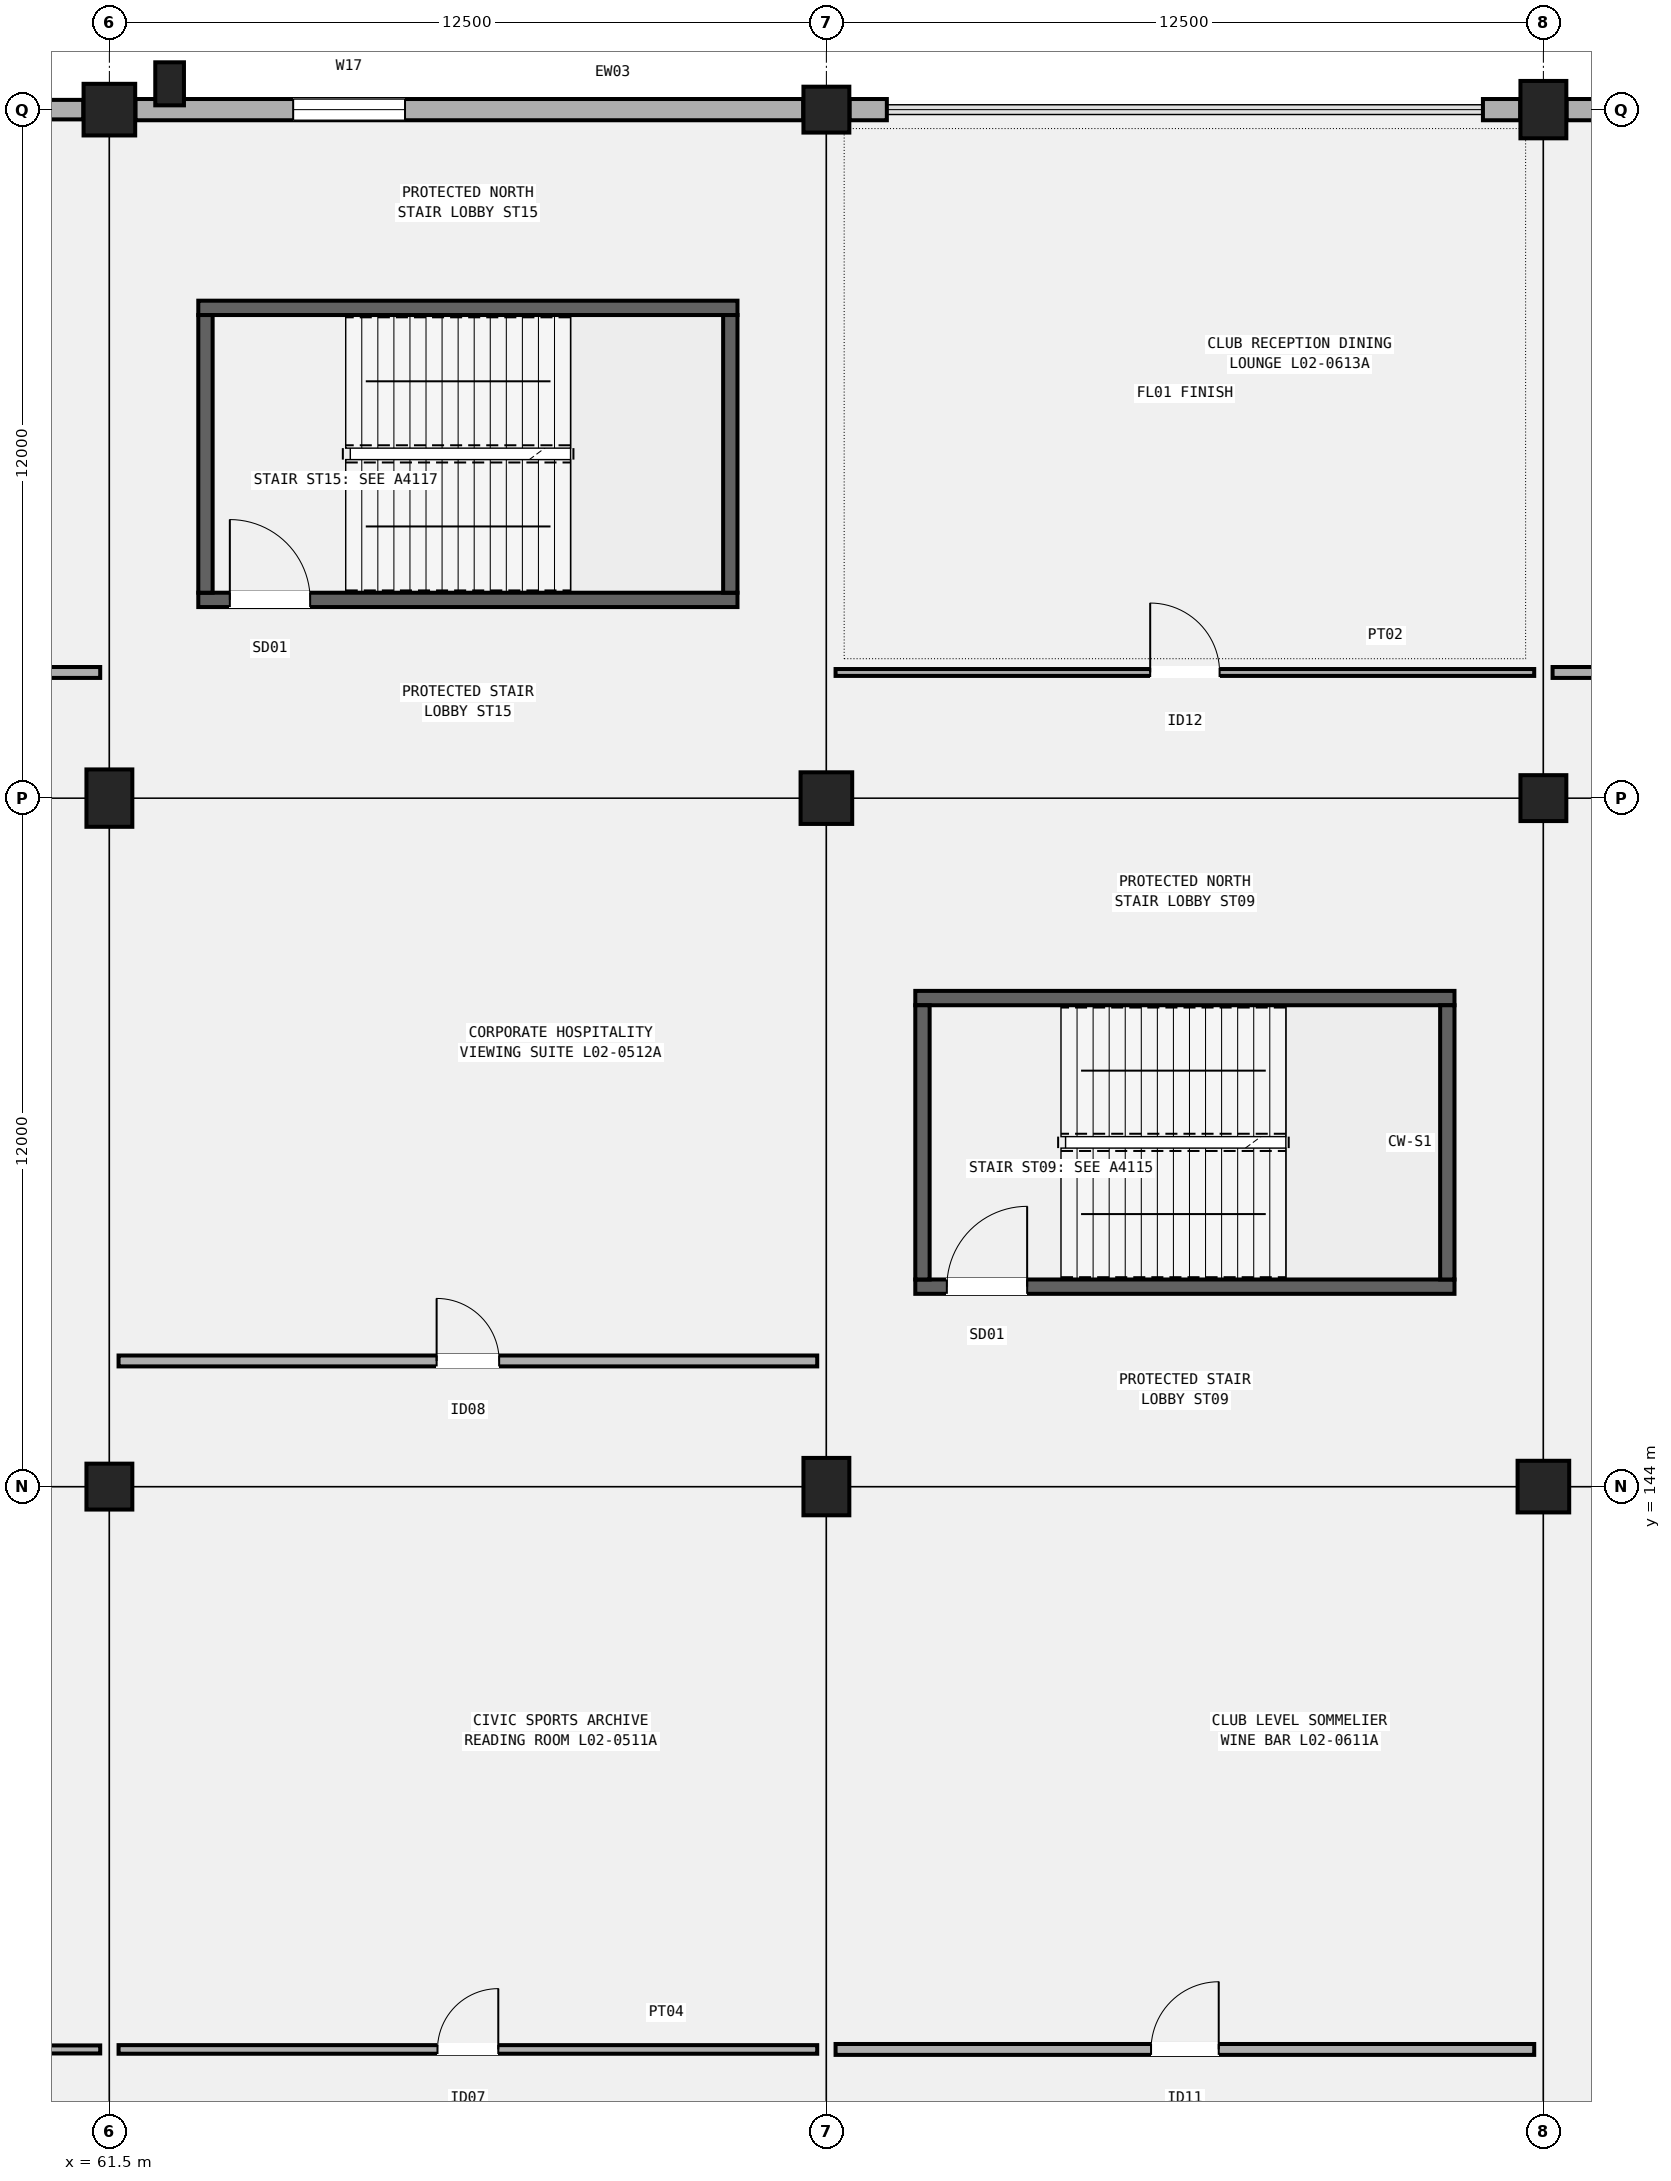
"""IFC4 building model, lengths in metres.
Left out: names, types, materials, properties, quantities, classifications, styles, units other than length and angle.
Written with IfcOpenShell. Run it as: python <this file> out.ifc"""

import sys

from ifc_helpers import new_model, si_unit, direction, frame, frame_2d, origin, origin_2d, place, context, subcontext, project, spatial, rectangle, extrude, element, fill, save


model = new_model("IFC4")
c1 = context("Model", 3, precision=1e-05, world=origin(), true_north=direction((0.0, 1.0)))
c2 = subcontext(c1, "Body", "Model", "MODEL_VIEW")
j1 = project(units=[si_unit("LENGTHUNIT", "METRE"), si_unit("PLANEANGLEUNIT", "RADIAN")], contexts=[c1])
p1 = place(None, origin())
s1 = spatial("IfcSite", under=j1, at=p1, CompositionType="ELEMENT")
p2 = place(p1, origin())
s2 = spatial("IfcBuilding", under=s1, at=p2, CompositionType="ELEMENT")
p3 = place(p2, frame((0.0, 0.0, 10.2)))
s3 = spatial("IfcBuildingStorey", under=s2, at=p3, CompositionType="ELEMENT", Elevation=10.2)
p4 = place(p3, frame((61.5, 144.0, 0.0), z_axis=(0.0, 0.0, 1.0), x_axis=(1.0, 0.0, 0.0)))
e1 = element("IfcColumn", 1, at=p4, inside=s3, PredefinedType="COLUMN", context=c2, shape_type="SweptSolid", body=[
    extrude(rectangle(XDim=0.8, YDim=0.8, at=origin_2d()), origin(), (0.0, 0.0, 1.0), 5.1),
])
p5 = place(p3, frame((61.5, 156.0, 0.0), z_axis=(0.0, 0.0, 1.0), x_axis=(1.0, 0.0, 0.0)))
e2 = element("IfcColumn", 2, at=p5, inside=s3, PredefinedType="COLUMN", context=c2, shape_type="SweptSolid", body=[
    extrude(rectangle(XDim=0.8, YDim=1.0, at=origin_2d()), origin(), (0.0, 0.0, 1.0), 5.1),
])
p6 = place(p3, frame((61.5, 168.0, 0.0), z_axis=(0.0, 0.0, 1.0), x_axis=(1.0, 0.0, 0.0)))
e3 = element("IfcColumn", 3, at=p6, inside=s3, PredefinedType="COLUMN", context=c2, shape_type="SweptSolid", body=[
    extrude(rectangle(XDim=0.9, YDim=0.9, at=origin_2d()), origin(), (0.0, 0.0, 1.0), 5.1),
])
p7 = place(p3, frame((74.0, 144.0, 0.0), z_axis=(0.0, 0.0, 1.0), x_axis=(1.0, 0.0, 0.0)))
e4 = element("IfcColumn", 4, at=p7, inside=s3, PredefinedType="COLUMN", context=c2, shape_type="SweptSolid", body=[
    extrude(rectangle(XDim=0.8, YDim=1.0, at=origin_2d()), origin(), (0.0, 0.0, 1.0), 5.1),
])
p8 = place(p3, frame((74.0, 156.0, 0.0), z_axis=(0.0, 0.0, 1.0), x_axis=(1.0, 0.0, 0.0)))
e5 = element("IfcColumn", 5, at=p8, inside=s3, PredefinedType="COLUMN", context=c2, shape_type="SweptSolid", body=[
    extrude(rectangle(XDim=0.9, YDim=0.9, at=origin_2d()), origin(), (0.0, 0.0, 1.0), 5.1),
])
p9 = place(p3, frame((74.0, 168.0, 0.0), z_axis=(0.0, 0.0, 1.0), x_axis=(1.0, 0.0, 0.0)))
e6 = element("IfcColumn", 6, at=p9, inside=s3, PredefinedType="COLUMN", context=c2, shape_type="SweptSolid", body=[
    extrude(rectangle(XDim=0.8, YDim=0.8, at=origin_2d()), origin(), (0.0, 0.0, 1.0), 5.1),
])
p10 = place(p3, frame((86.5, 144.0, 0.0), z_axis=(0.0, 0.0, 1.0), x_axis=(1.0, 0.0, 0.0)))
e7 = element("IfcColumn", 7, at=p10, inside=s3, PredefinedType="COLUMN", context=c2, shape_type="SweptSolid", body=[
    extrude(rectangle(XDim=0.9, YDim=0.9, at=origin_2d()), origin(), (0.0, 0.0, 1.0), 5.1),
])
p11 = place(p3, frame((86.5, 156.0, 0.0), z_axis=(0.0, 0.0, 1.0), x_axis=(1.0, 0.0, 0.0)))
e8 = element("IfcColumn", 8, at=p11, inside=s3, PredefinedType="COLUMN", context=c2, shape_type="SweptSolid", body=[
    extrude(rectangle(XDim=0.8, YDim=0.8, at=origin_2d()), origin(), (0.0, 0.0, 1.0), 5.1),
])
p12 = place(p3, frame((86.5, 168.0, 0.0), z_axis=(0.0, 0.0, 1.0), x_axis=(1.0, 0.0, 0.0)))
e9 = element("IfcColumn", 9, at=p12, inside=s3, PredefinedType="COLUMN", context=c2, shape_type="SweptSolid", body=[
    extrude(rectangle(XDim=0.8, YDim=1.0, at=origin_2d()), origin(), (0.0, 0.0, 1.0), 5.1),
])
p13 = place(p3, frame((62.55, 168.45, 0.0), z_axis=(0.0, 0.0, 1.0), x_axis=(1.0, 0.0, 0.0)))
e10 = element("IfcColumn", 10, at=p13, inside=s3, PredefinedType="PILASTER", context=c2, shape_type="SweptSolid", body=[
    extrude(rectangle(XDim=0.5, YDim=0.75, at=origin_2d()), origin(), (0.0, 0.0, 1.0), 5.1),
])
p14 = place(p3, frame((49.404, 168.0, 0.0), z_axis=(0.0, 0.0, 1.0), x_axis=(1.0, 0.0, 0.0)))
e11 = element("IfcWall", 11, at=p14, inside=s3, PredefinedType="SOLIDWALL", context=c2, shape_type="SweptSolid", body=[
    extrude(rectangle(XDim=11.642, YDim=0.34, at=frame_2d((5.821, 0.0))), origin(), (0.0, 0.0, 1.0), 4.02),
])
p15 = place(p14, frame((1.5, 0.0, 0.95)))
e12 = element("IfcOpeningElement", 12, at=p15, cuts=e11, PredefinedType="OPENING", context=c2, shape_type="SweptSolid", body=[
    extrude(rectangle(XDim=1.8, YDim=2.15, at=frame_2d((0.9, 1.075))), frame((0.0, 0.18, 0.0), z_axis=(0.0, -1.0, 0.0), x_axis=(1.0, 0.0, 0.0)), (0.0, 0.0, 1.0), 0.36),
])
p16 = place(p3, frame((61.954, 168.0, 0.0), z_axis=(0.0, 0.0, 1.0), x_axis=(1.0, 0.0, 0.0)))
e13 = element("IfcWall", 13, at=p16, inside=s3, PredefinedType="SOLIDWALL", context=c2, shape_type="SweptSolid", body=[
    extrude(rectangle(XDim=11.642, YDim=0.37, at=frame_2d((5.821, 0.0))), origin(), (0.0, 0.0, 1.0), 4.12),
])
p17 = place(p16, frame((2.75, 0.0, 0.95)))
e14 = element("IfcOpeningElement", 14, at=p17, cuts=e13, PredefinedType="OPENING", context=c2, shape_type="SweptSolid", body=[
    extrude(rectangle(XDim=1.95, YDim=2.35, at=frame_2d((0.975, 1.175))), frame((0.0, 0.195, 0.0), z_axis=(0.0, -1.0, 0.0), x_axis=(1.0, 0.0, 0.0)), (0.0, 0.0, 1.0), 0.39),
])
for number, where, z_axis, x_axis in (
    (15, (74.404, 168.0, 0.0), (0.0, 0.0, 1.0), (1.0, 0.0, 0.0)),
    (16, (85.446, 168.0, 0.0), (0.0, 0.0, 1.0), (1.0, 0.0, 0.0)),
):
    element("IfcWall", number, at=place(p3, frame(where, z_axis=z_axis, x_axis=x_axis)), inside=s3, PredefinedType="SOLIDWALL", context=c2, shape_type="SweptSolid", body=[
        extrude(rectangle(XDim=0.65, YDim=0.37, at=frame_2d((0.325, 0.0))), origin(), (0.0, 0.0, 1.0), 4.22),
    ])
p18 = place(p3, frame((86.904, 168.0, 0.0), z_axis=(0.0, 0.0, 1.0), x_axis=(1.0, 0.0, 0.0)))
e17 = element("IfcWall", 17, at=p18, inside=s3, PredefinedType="SOLIDWALL", context=c2, shape_type="SweptSolid", body=[
    extrude(rectangle(XDim=0.65, YDim=0.37, at=frame_2d((0.325, 0.0))), origin(), (0.0, 0.0, 1.0), 4.02),
])
p19 = place(p3, frame((75.55, 147.485, 0.0), z_axis=(0.0, 0.0, 1.0), x_axis=(1.0, 0.0, 0.0)))
e18 = element("IfcWall", 18, at=p19, inside=s3, PredefinedType="SHEAR", context=c2, shape_type="SweptSolid", body=[
    extrude(rectangle(XDim=9.4, YDim=0.25, at=frame_2d((4.7, 0.0))), origin(), (0.0, 0.0, 1.0), 4.82),
])
p20 = place(p19, frame((0.55, 0.0, 0.0)))
e19 = element("IfcOpeningElement", 19, at=p20, cuts=e18, PredefinedType="OPENING", context=c2, shape_type="SweptSolid", body=[
    extrude(rectangle(XDim=1.4, YDim=2.15, at=frame_2d((0.7, 1.075))), frame((0.0, 0.135, 0.0), z_axis=(0.0, -1.0, 0.0), x_axis=(1.0, 0.0, 0.0)), (0.0, 0.0, 1.0), 0.27),
])
p21 = place(p3, frame((75.55, 152.515, 0.0), z_axis=(0.0, 0.0, 1.0), x_axis=(1.0, 0.0, 0.0)))
e20 = element("IfcWall", 20, at=p21, inside=s3, PredefinedType="SHEAR", context=c2, shape_type="SweptSolid", body=[
    extrude(rectangle(XDim=9.4, YDim=0.25, at=frame_2d((4.7, 0.0))), origin(), (0.0, 0.0, 1.0), 4.82),
])
for number, where, z_axis, x_axis in (
    (21, (75.675, 147.61, 0.0), (0.0, 0.0, 1.0), (0.0, 1.0, 0.0)),
    (22, (84.825, 147.61, 0.0), (0.0, 0.0, 1.0), (0.0, 1.0, 0.0)),
):
    element("IfcWall", number, at=place(p3, frame(where, z_axis=z_axis, x_axis=x_axis)), inside=s3, PredefinedType="SHEAR", context=c2, shape_type="SweptSolid", body=[
        extrude(rectangle(XDim=4.78, YDim=0.25, at=frame_2d((2.39, 0.0))), origin(), (0.0, 0.0, 1.0), 4.82),
    ])
p22 = place(p3, frame((63.05, 159.455, 0.0), z_axis=(0.0, 0.0, 1.0), x_axis=(1.0, 0.0, 0.0)))
e23 = element("IfcWall", 23, at=p22, inside=s3, PredefinedType="SHEAR", context=c2, shape_type="SweptSolid", body=[
    extrude(rectangle(XDim=9.4, YDim=0.25, at=frame_2d((4.7, 0.0))), origin(), (0.0, 0.0, 1.0), 4.82),
])
p23 = place(p22, frame((0.55, 0.0, 0.0)))
e24 = element("IfcOpeningElement", 24, at=p23, cuts=e23, PredefinedType="OPENING", context=c2, shape_type="SweptSolid", body=[
    extrude(rectangle(XDim=1.4, YDim=2.15, at=frame_2d((0.7, 1.075))), frame((0.0, 0.135, 0.0), z_axis=(0.0, -1.0, 0.0), x_axis=(1.0, 0.0, 0.0)), (0.0, 0.0, 1.0), 0.27),
])
p24 = place(p3, frame((63.05, 164.545, 0.0), z_axis=(0.0, 0.0, 1.0), x_axis=(1.0, 0.0, 0.0)))
e25 = element("IfcWall", 25, at=p24, inside=s3, PredefinedType="SHEAR", context=c2, shape_type="SweptSolid", body=[
    extrude(rectangle(XDim=9.4, YDim=0.25, at=frame_2d((4.7, 0.0))), origin(), (0.0, 0.0, 1.0), 4.82),
])
for number, where, z_axis, x_axis in (
    (26, (63.175, 159.58, 0.0), (0.0, 0.0, 1.0), (0.0, 1.0, 0.0)),
    (27, (72.325, 159.58, 0.0), (0.0, 0.0, 1.0), (0.0, 1.0, 0.0)),
):
    element("IfcWall", number, at=place(p3, frame(where, z_axis=z_axis, x_axis=x_axis)), inside=s3, PredefinedType="SHEAR", context=c2, shape_type="SweptSolid", body=[
        extrude(rectangle(XDim=4.84, YDim=0.25, at=frame_2d((2.42, 0.0))), origin(), (0.0, 0.0, 1.0), 4.82),
    ])
p25 = place(p3, frame((51.12, 134.19, 0.0), z_axis=(0.0, 0.0, 1.0), x_axis=(1.0, 0.0, 0.0)))
e28 = element("IfcWall", 28, at=p25, inside=s3, PredefinedType="PARTITIONING", context=c2, shape_type="SweptSolid", body=[
    extrude(rectangle(XDim=10.22, YDim=0.14, at=frame_2d((5.11, 0.0))), origin(), (0.0, 0.0, 1.0), 4.22),
])
p26 = place(p25, frame((4.62, 0.0, 0.0)))
e29 = element("IfcOpeningElement", 29, at=p26, cuts=e28, PredefinedType="OPENING", context=c2, shape_type="SweptSolid", body=[
    extrude(rectangle(XDim=0.98, YDim=2.1, at=frame_2d((0.49, 1.05))), frame((0.0, 0.08, 0.0), z_axis=(0.0, -1.0, 0.0), x_axis=(1.0, 0.0, 0.0)), (0.0, 0.0, 1.0), 0.16),
])
p27 = place(p3, frame((51.12, 158.19, 0.0), z_axis=(0.0, 0.0, 1.0), x_axis=(1.0, 0.0, 0.0)))
e30 = element("IfcWall", 30, at=p27, inside=s3, PredefinedType="PARTITIONING", context=c2, shape_type="SweptSolid", body=[
    extrude(rectangle(XDim=10.22, YDim=0.19, at=frame_2d((5.11, 0.0))), origin(), (0.0, 0.0, 1.0), 4.22),
])
p28 = place(p27, frame((4.61, 0.0, 0.0)))
e31 = element("IfcOpeningElement", 31, at=p28, cuts=e30, PredefinedType="OPENING", context=c2, shape_type="SweptSolid", body=[
    extrude(rectangle(XDim=1.0, YDim=2.14, at=frame_2d((0.5, 1.07))), frame((0.0, 0.105, 0.0), z_axis=(0.0, -1.0, 0.0), x_axis=(1.0, 0.0, 0.0)), (0.0, 0.0, 1.0), 0.21),
])
p29 = place(p3, frame((61.66, 134.19, 0.0), z_axis=(0.0, 0.0, 1.0), x_axis=(1.0, 0.0, 0.0)))
e32 = element("IfcWall", 32, at=p29, inside=s3, PredefinedType="PARTITIONING", context=c2, shape_type="SweptSolid", body=[
    extrude(rectangle(XDim=12.18, YDim=0.15, at=frame_2d((6.09, 0.0))), origin(), (0.0, 0.0, 1.0), 4.22),
])
p30 = place(p29, frame((5.56, 0.0, 0.0)))
e33 = element("IfcOpeningElement", 33, at=p30, cuts=e32, PredefinedType="OPENING", context=c2, shape_type="SweptSolid", body=[
    extrude(rectangle(XDim=1.06, YDim=2.15, at=frame_2d((0.53, 1.075))), frame((0.0, 0.085, 0.0), z_axis=(0.0, -1.0, 0.0), x_axis=(1.0, 0.0, 0.0)), (0.0, 0.0, 1.0), 0.17),
])
p31 = place(p3, frame((61.66, 146.19, 0.0), z_axis=(0.0, 0.0, 1.0), x_axis=(1.0, 0.0, 0.0)))
e34 = element("IfcWall", 34, at=p31, inside=s3, PredefinedType="PARTITIONING", context=c2, shape_type="SweptSolid", body=[
    extrude(rectangle(XDim=12.18, YDim=0.19, at=frame_2d((6.09, 0.0))), origin(), (0.0, 0.0, 1.0), 4.22),
])
p32 = place(p31, frame((5.545, 0.0, 0.0)))
e35 = element("IfcOpeningElement", 35, at=p32, cuts=e34, PredefinedType="OPENING", context=c2, shape_type="SweptSolid", body=[
    extrude(rectangle(XDim=1.09, YDim=2.16, at=frame_2d((0.545, 1.08))), frame((0.0, 0.105, 0.0), z_axis=(0.0, -1.0, 0.0), x_axis=(1.0, 0.0, 0.0)), (0.0, 0.0, 1.0), 0.21),
])
p33 = place(p3, frame((74.16, 134.19, 0.0), z_axis=(0.0, 0.0, 1.0), x_axis=(1.0, 0.0, 0.0)))
e36 = element("IfcWall", 36, at=p33, inside=s3, PredefinedType="PARTITIONING", context=c2, shape_type="SweptSolid", body=[
    extrude(rectangle(XDim=12.18, YDim=0.19, at=frame_2d((6.09, 0.0))), origin(), (0.0, 0.0, 1.0), 4.22),
])
p34 = place(p33, frame((5.5, 0.0, 0.0)))
e37 = element("IfcOpeningElement", 37, at=p34, cuts=e36, PredefinedType="OPENING", context=c2, shape_type="SweptSolid", body=[
    extrude(rectangle(XDim=1.18, YDim=2.2, at=frame_2d((0.59, 1.1))), frame((0.0, 0.105, 0.0), z_axis=(0.0, -1.0, 0.0), x_axis=(1.0, 0.0, 0.0)), (0.0, 0.0, 1.0), 0.21),
])
p35 = place(p3, frame((74.16, 158.19, 0.0), z_axis=(0.0, 0.0, 1.0), x_axis=(1.0, 0.0, 0.0)))
e38 = element("IfcWall", 38, at=p35, inside=s3, PredefinedType="PARTITIONING", context=c2, shape_type="SweptSolid", body=[
    extrude(rectangle(XDim=12.18, YDim=0.12, at=frame_2d((6.09, 0.0))), origin(), (0.0, 0.0, 1.0), 4.22),
])
p36 = place(p35, frame((5.485, 0.0, 0.0)))
e39 = element("IfcOpeningElement", 39, at=p36, cuts=e38, PredefinedType="OPENING", context=c2, shape_type="SweptSolid", body=[
    extrude(rectangle(XDim=1.21, YDim=2.18, at=frame_2d((0.605, 1.09))), frame((0.0, 0.07, 0.0), z_axis=(0.0, -1.0, 0.0), x_axis=(1.0, 0.0, 0.0)), (0.0, 0.0, 1.0), 0.14),
])
p37 = place(p3, frame((86.66, 158.19, 0.0), z_axis=(0.0, 0.0, 1.0), x_axis=(1.0, 0.0, 0.0)))
e40 = element("IfcWall", 40, at=p37, inside=s3, PredefinedType="PARTITIONING", context=c2, shape_type="SweptSolid", body=[
    extrude(rectangle(XDim=12.18, YDim=0.19, at=frame_2d((6.09, 0.0))), origin(), (0.0, 0.0, 1.0), 4.22),
])
p38 = place(p37, frame((5.455, 0.0, 0.0)))
e41 = element("IfcOpeningElement", 41, at=p38, cuts=e40, PredefinedType="OPENING", context=c2, shape_type="SweptSolid", body=[
    extrude(rectangle(XDim=1.27, YDim=2.2, at=frame_2d((0.635, 1.1))), frame((0.0, 0.105, 0.0), z_axis=(0.0, -1.0, 0.0), x_axis=(1.0, 0.0, 0.0)), (0.0, 0.0, 1.0), 0.21),
])
p39 = place(p17, origin())
e42 = element("IfcWindow", 42, at=p39, inside=s3, PartitioningType="SINGLE_PANEL", PredefinedType="WINDOW", context=c2, shape_type="SweptSolid", body=[
    extrude(rectangle(XDim=1.95, YDim=2.35, at=frame_2d((0.975, 1.175))), frame((0.0, 0.03, 0.0), z_axis=(0.0, -1.0, 0.0), x_axis=(1.0, 0.0, 0.0)), (0.0, 0.0, 1.0), 0.06),
])
fill(e14, e42)
p40 = place(p20, origin())
e43 = element("IfcDoor", 43, at=p40, inside=s3, OperationType="SINGLE_SWING_RIGHT", PredefinedType="DOOR", context=c2, shape_type="SweptSolid", body=[
    extrude(rectangle(XDim=1.4, YDim=2.15, at=frame_2d((0.7, 1.075))), frame((0.0, 0.025, 0.0), z_axis=(0.0, -1.0, 0.0), x_axis=(1.0, 0.0, 0.0)), (0.0, 0.0, 1.0), 0.05),
])
fill(e19, e43)
p41 = place(p23, origin())
e44 = element("IfcDoor", 44, at=p41, inside=s3, OperationType="SINGLE_SWING_LEFT", PredefinedType="DOOR", context=c2, shape_type="SweptSolid", body=[
    extrude(rectangle(XDim=1.4, YDim=2.15, at=frame_2d((0.7, 1.075))), frame((0.0, 0.025, 0.0), z_axis=(0.0, -1.0, 0.0), x_axis=(1.0, 0.0, 0.0)), (0.0, 0.0, 1.0), 0.05),
])
fill(e24, e44)
p42 = place(p30, origin())
e45 = element("IfcDoor", 45, at=p42, inside=s3, OperationType="SINGLE_SWING_RIGHT", PredefinedType="DOOR", context=c2, shape_type="SweptSolid", body=[
    extrude(rectangle(XDim=1.06, YDim=2.15, at=frame_2d((0.53, 1.075))), frame((0.0, 0.025, 0.0), z_axis=(0.0, -1.0, 0.0), x_axis=(1.0, 0.0, 0.0)), (0.0, 0.0, 1.0), 0.05),
])
fill(e33, e45)
p43 = place(p32, origin())
e46 = element("IfcDoor", 46, at=p43, inside=s3, OperationType="SINGLE_SWING_LEFT", PredefinedType="DOOR", context=c2, shape_type="SweptSolid", body=[
    extrude(rectangle(XDim=1.09, YDim=2.16, at=frame_2d((0.545, 1.08))), frame((0.0, 0.025, 0.0), z_axis=(0.0, -1.0, 0.0), x_axis=(1.0, 0.0, 0.0)), (0.0, 0.0, 1.0), 0.05),
])
fill(e35, e46)
p44 = place(p34, origin())
e47 = element("IfcDoor", 47, at=p44, inside=s3, OperationType="SINGLE_SWING_RIGHT", PredefinedType="DOOR", context=c2, shape_type="SweptSolid", body=[
    extrude(rectangle(XDim=1.18, YDim=2.2, at=frame_2d((0.59, 1.1))), frame((0.0, 0.025, 0.0), z_axis=(0.0, -1.0, 0.0), x_axis=(1.0, 0.0, 0.0)), (0.0, 0.0, 1.0), 0.05),
])
fill(e37, e47)
p45 = place(p36, origin())
e48 = element("IfcDoor", 48, at=p45, inside=s3, OperationType="SINGLE_SWING_LEFT", PredefinedType="DOOR", context=c2, shape_type="SweptSolid", body=[
    extrude(rectangle(XDim=1.21, YDim=2.18, at=frame_2d((0.605, 1.09))), frame((0.0, 0.025, 0.0), z_axis=(0.0, -1.0, 0.0), x_axis=(1.0, 0.0, 0.0)), (0.0, 0.0, 1.0), 0.05),
])
fill(e39, e48)
save(model, sys.argv[1])
